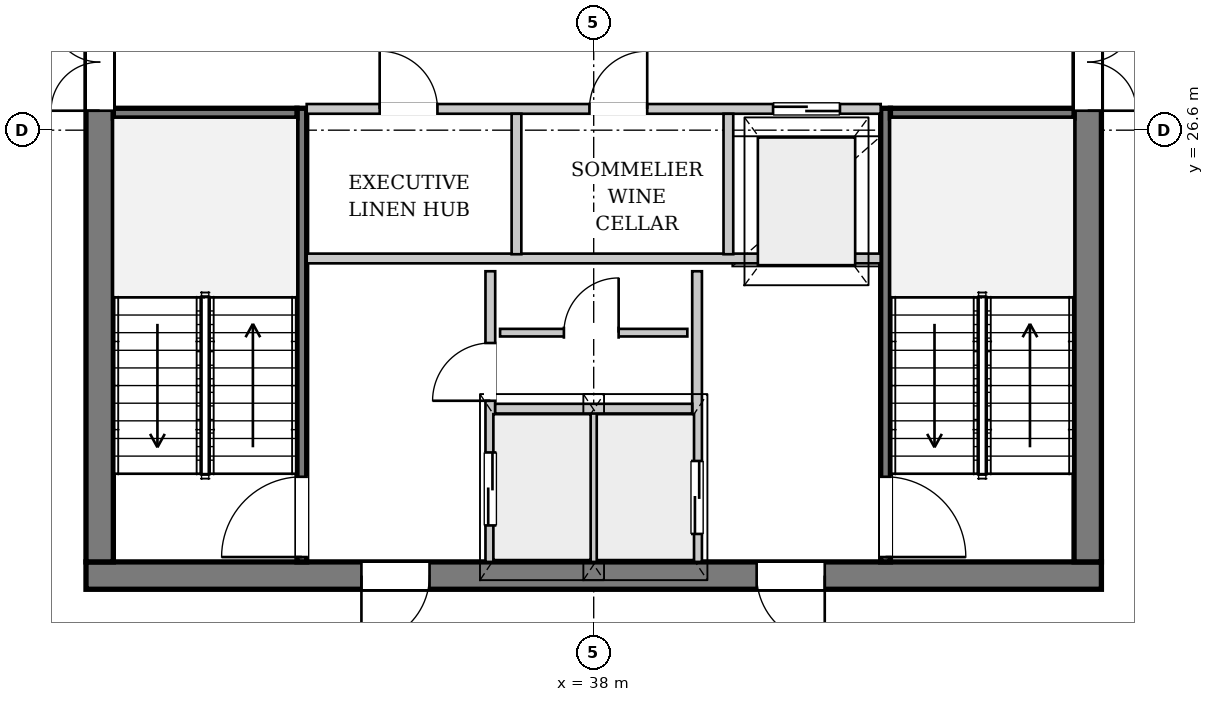
"""IFC4 building model, lengths in metres.
Left out: names, types, materials, properties, quantities, classifications, styles, units other than length and angle.
Written with IfcOpenShell. Run it as: python <this file> out.ifc"""

import sys

from ifc_helpers import new_model, si_unit, direction, frame, frame_2d, origin, place, context, subcontext, project, spatial, rectangle, extrude, source, transform, mapped, element, fill, save


model = new_model("IFC4")
c1 = context("Model", 3, precision=1e-05, world=origin(), true_north=direction((0.0, 1.0)))
c2 = subcontext(c1, "Body", "Model", "MODEL_VIEW")
j1 = project(units=[si_unit("LENGTHUNIT", "METRE"), si_unit("PLANEANGLEUNIT", "RADIAN")], contexts=[c1])
p1 = place(None, origin())
s1 = spatial("IfcSite", under=j1, at=p1, CompositionType="ELEMENT")
p2 = place(p1, origin())
s2 = spatial("IfcBuilding", under=s1, at=p2, CompositionType="ELEMENT")
p3 = place(p2, frame((0.0, 0.0, 263.3)))
s3 = spatial("IfcBuildingStorey", under=s2, at=p3, CompositionType="ELEMENT", Elevation=263.3)
p4 = place(p3, frame((51.577, 26.839, 0.0), z_axis=(0.0, 0.0, 1.0), x_axis=(-0.252928525252, -0.967484966867, 0.0)))
e1 = element("IfcWall", 1, at=p4, inside=s3, PredefinedType="SOLIDWALL", context=c2, shape_type="SweptSolid", body=[
    extrude(rectangle(XDim=22.323, YDim=0.32, at=frame_2d((11.161, 0.0))), origin(), (0.0, 0.0, 1.0), 2.872),
])
p5 = place(p4, frame((6.393, 0.0, 0.0)))
e2 = element("IfcOpeningElement", 2, at=p5, cuts=e1, PredefinedType="OPENING", context=c2, shape_type="SweptSolid", body=[
    extrude(rectangle(XDim=1.5, YDim=2.3, at=frame_2d((0.75, 1.15))), frame((0.0, 0.17, 0.0), z_axis=(0.0, -1.0, 0.0), x_axis=(1.0, 0.0, 0.0)), (0.0, 0.0, 1.0), 0.34),
])
p6 = place(p4, frame((15.219, 0.0, 0.402)))
e3 = element("IfcOpeningElement", 3, at=p6, cuts=e1, PredefinedType="OPENING", context=c2, shape_type="SweptSolid", body=[
    extrude(rectangle(XDim=2.6, YDim=2.35, at=frame_2d((1.3, 1.175))), frame((0.0, 0.17, 0.0), z_axis=(0.0, -1.0, 0.0), x_axis=(1.0, 0.0, 0.0)), (0.0, 0.0, 1.0), 0.34),
])
p7 = place(p3, frame((15.894, 26.68, 0.0), z_axis=(0.0, 0.0, 1.0), x_axis=(0.802229105353, 0.59701630005, 0.0)))
e4 = element("IfcWall", 4, at=p7, inside=s3, PredefinedType="SOLIDWALL", context=c2, shape_type="SweptSolid", body=[
    extrude(rectangle(XDim=21.802, YDim=0.38, at=frame_2d((10.901, 0.0))), origin(), (0.0, 0.0, 1.0), 2.872),
])
p8 = place(p7, frame((7.105, 0.0, 0.65)))
e5 = element("IfcOpeningElement", 5, at=p8, cuts=e4, PredefinedType="OPENING", context=c2, shape_type="SweptSolid", body=[
    extrude(rectangle(XDim=1.2, YDim=1.5, at=frame_2d((0.6, 0.75))), frame((0.0, 0.2, 0.0), z_axis=(0.0, -1.0, 0.0), x_axis=(1.0, 0.0, 0.0)), (0.0, 0.0, 1.0), 0.4),
])
p9 = place(p7, frame((16.698, 0.0, 0.65)))
e6 = element("IfcOpeningElement", 6, at=p9, cuts=e4, PredefinedType="OPENING", context=c2, shape_type="SweptSolid", body=[
    extrude(rectangle(XDim=1.2, YDim=1.5, at=frame_2d((0.6, 0.75))), frame((0.0, 0.2, 0.0), z_axis=(0.0, -1.0, 0.0), x_axis=(1.0, 0.0, 0.0)), (0.0, 0.0, 1.0), 0.4),
])
p10 = place(p3, frame((46.35, 19.275, 0.0), z_axis=(0.0, 0.0, 1.0), x_axis=(-1.0, 0.0, 0.0)))
e7 = element("IfcWall", 7, at=p10, inside=s3, PredefinedType="SHEAR", context=c2, shape_type="SweptSolid", body=[
    extrude(rectangle(XDim=16.7, YDim=0.45, at=frame_2d((8.35, 0.0))), origin(), (0.0, 0.0, 1.0), 3.38),
])
p11 = place(p10, frame((4.55, 0.0, 0.0)))
e8 = element("IfcOpeningElement", 8, at=p11, cuts=e7, PredefinedType="OPENING", context=c2, shape_type="SweptSolid", body=[
    extrude(rectangle(XDim=1.12, YDim=2.25, at=frame_2d((0.56, 1.125))), frame((0.0, 0.235, 0.0), z_axis=(0.0, -1.0, 0.0), x_axis=(1.0, 0.0, 0.0)), (0.0, 0.0, 1.0), 0.47),
])
p12 = place(p10, frame((11.05, 0.0, 0.0)))
e9 = element("IfcOpeningElement", 9, at=p12, cuts=e7, PredefinedType="OPENING", context=c2, shape_type="SweptSolid", body=[
    extrude(rectangle(XDim=1.12, YDim=2.25, at=frame_2d((0.56, 1.125))), frame((0.0, 0.235, 0.0), z_axis=(0.0, -1.0, 0.0), x_axis=(1.0, 0.0, 0.0)), (0.0, 0.0, 1.0), 0.47),
])
p13 = place(p3, frame((29.875, 19.5, 0.0), z_axis=(0.0, 0.0, 1.0), x_axis=(0.0, 1.0, 0.0)))
e10 = element("IfcWall", 10, at=p13, inside=s3, PredefinedType="SHEAR", context=c2, shape_type="SweptSolid", body=[
    extrude(rectangle(XDim=14.2, YDim=0.45, at=frame_2d((7.1, 0.0))), origin(), (0.0, 0.0, 1.0), 3.38),
])
p14 = place(p13, frame((7.42, 0.0, 0.0)))
e11 = element("IfcOpeningElement", 11, at=p14, cuts=e10, PredefinedType="OPENING", context=c2, shape_type="SweptSolid", body=[
    extrude(rectangle(XDim=1.6, YDim=2.2, at=frame_2d((0.8, 1.1))), frame((0.0, 0.235, 0.0), z_axis=(0.0, -1.0, 0.0), x_axis=(1.0, 0.0, 0.0)), (0.0, 0.0, 1.0), 0.47),
])
p15 = place(p3, frame((46.125, 33.7, 0.0), z_axis=(0.0, 0.0, 1.0), x_axis=(0.0, -1.0, 0.0)))
e12 = element("IfcWall", 12, at=p15, inside=s3, PredefinedType="SHEAR", context=c2, shape_type="SweptSolid", body=[
    extrude(rectangle(XDim=14.2, YDim=0.45, at=frame_2d((7.1, 0.0))), origin(), (0.0, 0.0, 1.0), 3.38),
])
p16 = place(p15, frame((5.18, 0.0, 0.0)))
e13 = element("IfcOpeningElement", 13, at=p16, cuts=e12, PredefinedType="OPENING", context=c2, shape_type="SweptSolid", body=[
    extrude(rectangle(XDim=1.6, YDim=2.2, at=frame_2d((0.8, 1.1))), frame((0.0, 0.235, 0.0), z_axis=(0.0, -1.0, 0.0), x_axis=(1.0, 0.0, 0.0)), (0.0, 0.0, 1.0), 0.47),
])
p17 = place(p15, frame((2.05, 0.0, 0.0)))
e14 = element("IfcOpeningElement", 14, at=p17, cuts=e12, PredefinedType="OPENING", context=c2, shape_type="SweptSolid", body=[
    extrude(rectangle(XDim=0.95, YDim=2.1, at=frame_2d((0.475, 1.05))), frame((0.0, 0.235, 0.0), z_axis=(0.0, -1.0, 0.0), x_axis=(1.0, 0.0, 0.0)), (0.0, 0.0, 1.0), 0.47),
])
p18 = place(p3, frame((33.2, 19.5, 0.0), z_axis=(0.0, 0.0, 1.0), x_axis=(0.0, 1.0, 0.0)))
e15 = element("IfcWall", 15, at=p18, inside=s3, PredefinedType="PARTITIONING", context=c2, shape_type="SweptSolid", body=[
    extrude(rectangle(XDim=7.46, YDim=0.16, at=frame_2d((3.73, 0.0))), origin(), (0.0, 0.0, 1.0), 3.38),
])
p19 = place(p18, frame((0.08, 0.0, 0.0)))
e16 = element("IfcOpeningElement", 16, at=p19, cuts=e15, PredefinedType="OPENING", context=c2, shape_type="SweptSolid", body=[
    extrude(rectangle(XDim=1.32, YDim=2.2, at=frame_2d((0.66, 1.1))), frame((0.0, 0.09, 0.0), z_axis=(0.0, -1.0, 0.0), x_axis=(1.0, 0.0, 0.0)), (0.0, 0.0, 1.0), 0.18),
])
p20 = place(p3, frame((30.1, 26.88, 0.0), z_axis=(0.0, 0.0, 1.0), x_axis=(1.0, 0.0, 0.0)))
e17 = element("IfcWall", 17, at=p20, inside=s3, PredefinedType="PARTITIONING", context=c2, shape_type="SweptSolid", body=[
    extrude(rectangle(XDim=3.02, YDim=0.16, at=frame_2d((1.51, 0.0))), origin(), (0.0, 0.0, 1.0), 3.38),
])
p21 = place(p3, frame((42.8, 26.96, 0.0), z_axis=(0.0, 0.0, 1.0), x_axis=(0.0, -1.0, 0.0)))
e18 = element("IfcWall", 18, at=p21, inside=s3, PredefinedType="PARTITIONING", context=c2, shape_type="SweptSolid", body=[
    extrude(rectangle(XDim=7.46, YDim=0.16, at=frame_2d((3.73, 0.0))), origin(), (0.0, 0.0, 1.0), 3.38),
])
p22 = place(p21, frame((6.06, 0.0, 0.0)))
e19 = element("IfcOpeningElement", 19, at=p22, cuts=e18, PredefinedType="OPENING", context=c2, shape_type="SweptSolid", body=[
    extrude(rectangle(XDim=1.32, YDim=2.2, at=frame_2d((0.66, 1.1))), frame((0.0, 0.09, 0.0), z_axis=(0.0, -1.0, 0.0), x_axis=(1.0, 0.0, 0.0)), (0.0, 0.0, 1.0), 0.18),
])
p23 = place(p3, frame((42.88, 26.88, 0.0), z_axis=(0.0, 0.0, 1.0), x_axis=(1.0, 0.0, 0.0)))
e20 = element("IfcWall", 20, at=p23, inside=s3, PredefinedType="PARTITIONING", context=c2, shape_type="SweptSolid", body=[
    extrude(rectangle(XDim=3.02, YDim=0.16, at=frame_2d((1.51, 0.0))), origin(), (0.0, 0.0, 1.0), 3.38),
])
p24 = place(p3, frame((36.3, 19.5, 0.0), z_axis=(0.0, 0.0, 1.0), x_axis=(0.0, 1.0, 0.0)))
e21 = element("IfcWall", 21, at=p24, inside=s3, PredefinedType="PARTITIONING", context=c2, shape_type="SweptSolid", body=[
    extrude(rectangle(XDim=4.78, YDim=0.16, at=frame_2d((2.39, 0.0))), origin(), (0.0, 0.0, 1.0), 3.38),
])
p25 = place(p24, frame((0.6, 0.0, 0.0)))
e22 = element("IfcOpeningElement", 22, at=p25, cuts=e21, PredefinedType="OPENING", context=c2, shape_type="SweptSolid", body=[
    extrude(rectangle(XDim=1.2, YDim=2.2, at=frame_2d((0.6, 1.1))), frame((0.0, 0.09, 0.0), z_axis=(0.0, -1.0, 0.0), x_axis=(1.0, 0.0, 0.0)), (0.0, 0.0, 1.0), 0.18),
])
p26 = place(p24, frame((2.65, 0.0, 0.0)))
e23 = element("IfcOpeningElement", 23, at=p26, cuts=e21, PredefinedType="OPENING", context=c2, shape_type="SweptSolid", body=[
    extrude(rectangle(XDim=0.95, YDim=2.1, at=frame_2d((0.475, 1.05))), frame((0.0, 0.09, 0.0), z_axis=(0.0, -1.0, 0.0), x_axis=(1.0, 0.0, 0.0)), (0.0, 0.0, 1.0), 0.18),
])
p27 = place(p3, frame((39.7, 24.28, 0.0), z_axis=(0.0, 0.0, 1.0), x_axis=(0.0, -1.0, 0.0)))
e24 = element("IfcWall", 24, at=p27, inside=s3, PredefinedType="PARTITIONING", context=c2, shape_type="SweptSolid", body=[
    extrude(rectangle(XDim=4.78, YDim=0.16, at=frame_2d((2.39, 0.0))), origin(), (0.0, 0.0, 1.0), 3.38),
])
p28 = place(p27, frame((3.12, 0.0, 0.0)))
e25 = element("IfcOpeningElement", 25, at=p28, cuts=e24, PredefinedType="OPENING", context=c2, shape_type="SweptSolid", body=[
    extrude(rectangle(XDim=1.2, YDim=2.2, at=frame_2d((0.6, 1.1))), frame((0.0, 0.09, 0.0), z_axis=(0.0, -1.0, 0.0), x_axis=(1.0, 0.0, 0.0)), (0.0, 0.0, 1.0), 0.18),
])
p29 = place(p3, frame((38.0, 19.5, 0.0), z_axis=(0.0, 0.0, 1.0), x_axis=(0.0, 1.0, 0.0)))
e26 = element("IfcWall", 26, at=p29, inside=s3, PredefinedType="PARTITIONING", context=c2, shape_type="SweptSolid", body=[
    extrude(rectangle(XDim=2.46, YDim=0.125, at=frame_2d((1.23, 0.0))), origin(), (0.0, 0.0, 1.0), 3.38),
])
p30 = place(p3, frame((36.38, 22.02, 0.0), z_axis=(0.0, 0.0, 1.0), x_axis=(1.0, 0.0, 0.0)))
e27 = element("IfcWall", 27, at=p30, inside=s3, PredefinedType="PARTITIONING", context=c2, shape_type="SweptSolid", body=[
    extrude(rectangle(XDim=3.24, YDim=0.16, at=frame_2d((1.62, 0.0))), origin(), (0.0, 0.0, 1.0), 3.38),
])
p31 = place(p3, frame((33.28, 24.49, 0.0), z_axis=(0.0, 0.0, 1.0), x_axis=(1.0, 0.0, 0.0)))
e28 = element("IfcWall", 28, at=p31, inside=s3, PredefinedType="PARTITIONING", context=c2, shape_type="SweptSolid", body=[
    extrude(rectangle(XDim=9.44, YDim=0.16, at=frame_2d((4.72, 0.0))), origin(), (0.0, 0.0, 1.0), 3.38),
])
p32 = place(p3, frame((36.46, 23.27, 0.0), z_axis=(0.0, 0.0, 1.0), x_axis=(1.0, 0.0, 0.0)))
e29 = element("IfcWall", 29, at=p32, inside=s3, PredefinedType="PARTITIONING", context=c2, shape_type="SweptSolid", body=[
    extrude(rectangle(XDim=3.08, YDim=0.125, at=frame_2d((1.54, 0.0))), origin(), (0.0, 0.0, 1.0), 3.38),
])
p33 = place(p32, frame((1.05, 0.0, 0.0)))
e30 = element("IfcOpeningElement", 30, at=p33, cuts=e29, PredefinedType="OPENING", context=c2, shape_type="SweptSolid", body=[
    extrude(rectangle(XDim=0.9, YDim=2.1, at=frame_2d((0.45, 1.05))), frame((0.0, 0.073, 0.0), z_axis=(0.0, -1.0, 0.0), x_axis=(1.0, 0.0, 0.0)), (0.0, 0.0, 1.0), 0.145),
])
p34 = place(p3, frame((33.28, 26.95, 0.0), z_axis=(0.0, 0.0, 1.0), x_axis=(1.0, 0.0, 0.0)))
e31 = element("IfcWall", 31, at=p34, inside=s3, PredefinedType="PARTITIONING", context=c2, shape_type="SweptSolid", body=[
    extrude(rectangle(XDim=9.44, YDim=0.16, at=frame_2d((4.72, 0.0))), origin(), (0.0, 0.0, 1.0), 3.38),
])
p35 = place(p34, frame((1.2, 0.0, 0.0)))
e32 = element("IfcOpeningElement", 32, at=p35, cuts=e31, PredefinedType="OPENING", context=c2, shape_type="SweptSolid", body=[
    extrude(rectangle(XDim=0.95, YDim=2.1, at=frame_2d((0.475, 1.05))), frame((0.0, 0.09, 0.0), z_axis=(0.0, -1.0, 0.0), x_axis=(1.0, 0.0, 0.0)), (0.0, 0.0, 1.0), 0.18),
])
p36 = place(p34, frame((4.65, 0.0, 0.0)))
e33 = element("IfcOpeningElement", 33, at=p36, cuts=e31, PredefinedType="OPENING", context=c2, shape_type="SweptSolid", body=[
    extrude(rectangle(XDim=0.95, YDim=2.1, at=frame_2d((0.475, 1.05))), frame((0.0, 0.09, 0.0), z_axis=(0.0, -1.0, 0.0), x_axis=(1.0, 0.0, 0.0)), (0.0, 0.0, 1.0), 0.18),
])
p37 = place(p34, frame((7.67, 0.0, 0.0)))
e34 = element("IfcOpeningElement", 34, at=p37, cuts=e31, PredefinedType="OPENING", context=c2, shape_type="SweptSolid", body=[
    extrude(rectangle(XDim=1.1, YDim=2.2, at=frame_2d((0.55, 1.1))), frame((0.0, 0.09, 0.0), z_axis=(0.0, -1.0, 0.0), x_axis=(1.0, 0.0, 0.0)), (0.0, 0.0, 1.0), 0.18),
])
for number, where, z_axis, x_axis in (
    (35, (36.73, 24.56, 0.0), (0.0, 0.0, 1.0), (0.0, 1.0, 0.0)),
    (36, (40.215, 24.56, 0.0), (0.0, 0.0, 1.0), (0.0, 1.0, 0.0)),
):
    element("IfcWall", number, at=place(p3, frame(where, z_axis=z_axis, x_axis=x_axis)), inside=s3, PredefinedType="PARTITIONING", context=c2, shape_type="SweptSolid", body=[
        extrude(rectangle(XDim=2.31, YDim=0.16, at=frame_2d((1.155, 0.0))), origin(), (0.0, 0.0, 1.0), 3.38),
    ])
m1 = source(origin(), c2, "Body", "SweptSolid", [
    extrude(rectangle(XDim=1.12, YDim=2.25, at=frame_2d((0.56, 1.125))), frame((0.0, 0.025, 0.0), z_axis=(0.0, -1.0, 0.0), x_axis=(1.0, 0.0, 0.0)), (0.0, 0.0, 1.0), 0.05),
])
p38 = place(p11, origin())
e37 = element("IfcDoor", 37, at=p38, inside=s3, OperationType="SINGLE_SWING_LEFT", PredefinedType="DOOR", context=c2, shape_type="MappedRepresentation", body=[
    mapped(m1, transform((0.0, 0.0, 0.0), x_axis=(1.0, 0.0, 0.0), y_axis=(0.0, 1.0, 0.0), z_axis=(0.0, 0.0, 1.0), scale=1.0)),
])
fill(e8, e37)
p39 = place(p12, origin())
e38 = element("IfcDoor", 38, at=p39, inside=s3, OperationType="SINGLE_SWING_RIGHT", PredefinedType="DOOR", context=c2, shape_type="MappedRepresentation", body=[
    mapped(m1, transform((0.0, 0.0, 0.0), x_axis=(1.0, 0.0, 0.0), y_axis=(0.0, 1.0, 0.0), z_axis=(0.0, 0.0, 1.0), scale=1.0)),
])
fill(e9, e38)
m2 = source(origin(), c2, "Body", "SweptSolid", [
    extrude(rectangle(XDim=1.6, YDim=2.2, at=frame_2d((0.8, 1.1))), frame((0.0, 0.025, 0.0), z_axis=(0.0, -1.0, 0.0), x_axis=(1.0, 0.0, 0.0)), (0.0, 0.0, 1.0), 0.05),
])
p40 = place(p14, origin())
e39 = element("IfcDoor", 39, at=p40, inside=s3, OperationType="DOUBLE_DOOR_SINGLE_SWING", PredefinedType="DOOR", context=c2, shape_type="MappedRepresentation", body=[
    mapped(m2, transform((0.0, 0.0, 0.0), x_axis=(1.0, 0.0, 0.0), y_axis=(0.0, 1.0, 0.0), z_axis=(0.0, 0.0, 1.0), scale=1.0)),
])
fill(e11, e39)
p41 = place(p16, origin())
e40 = element("IfcDoor", 40, at=p41, inside=s3, OperationType="DOUBLE_DOOR_SINGLE_SWING", PredefinedType="DOOR", context=c2, shape_type="MappedRepresentation", body=[
    mapped(m2, transform((0.0, 0.0, 0.0), x_axis=(1.0, 0.0, 0.0), y_axis=(0.0, 1.0, 0.0), z_axis=(0.0, 0.0, 1.0), scale=1.0)),
])
fill(e13, e40)
m3 = source(origin(), c2, "Body", "SweptSolid", [
    extrude(rectangle(XDim=1.32, YDim=2.2, at=frame_2d((0.66, 1.1))), frame((0.0, 0.025, 0.0), z_axis=(0.0, -1.0, 0.0), x_axis=(1.0, 0.0, 0.0)), (0.0, 0.0, 1.0), 0.05),
])
p42 = place(p19, origin())
e41 = element("IfcDoor", 41, at=p42, inside=s3, OperationType="SINGLE_SWING_LEFT", PredefinedType="DOOR", context=c2, shape_type="MappedRepresentation", body=[
    mapped(m3, transform((0.0, 0.0, 0.0), x_axis=(1.0, 0.0, 0.0), y_axis=(0.0, 1.0, 0.0), z_axis=(0.0, 0.0, 1.0), scale=1.0)),
])
fill(e16, e41)
p43 = place(p22, origin())
e42 = element("IfcDoor", 42, at=p43, inside=s3, OperationType="SINGLE_SWING_RIGHT", PredefinedType="DOOR", context=c2, shape_type="MappedRepresentation", body=[
    mapped(m3, transform((0.0, 0.0, 0.0), x_axis=(1.0, 0.0, 0.0), y_axis=(0.0, 1.0, 0.0), z_axis=(0.0, 0.0, 1.0), scale=1.0)),
])
fill(e19, e42)
m4 = source(origin(), c2, "Body", "SweptSolid", [
    extrude(rectangle(XDim=1.2, YDim=2.2, at=frame_2d((0.6, 1.1))), frame((0.0, 0.025, 0.0), z_axis=(0.0, -1.0, 0.0), x_axis=(1.0, 0.0, 0.0)), (0.0, 0.0, 1.0), 0.05),
])
p44 = place(p25, origin())
e43 = element("IfcDoor", 43, at=p44, inside=s3, OperationType="DOUBLE_DOOR_SLIDING", PredefinedType="DOOR", context=c2, shape_type="MappedRepresentation", body=[
    mapped(m4, transform((0.0, 0.0, 0.0), x_axis=(1.0, 0.0, 0.0), y_axis=(0.0, 1.0, 0.0), z_axis=(0.0, 0.0, 1.0), scale=1.0)),
])
fill(e22, e43)
m5 = source(origin(), c2, "Body", "SweptSolid", [
    extrude(rectangle(XDim=0.95, YDim=2.1, at=frame_2d((0.475, 1.05))), frame((0.0, 0.025, 0.0), z_axis=(0.0, -1.0, 0.0), x_axis=(1.0, 0.0, 0.0)), (0.0, 0.0, 1.0), 0.05),
])
p45 = place(p26, origin())
e44 = element("IfcDoor", 44, at=p45, inside=s3, OperationType="SINGLE_SWING_LEFT", PredefinedType="DOOR", context=c2, shape_type="MappedRepresentation", body=[
    mapped(m5, transform((0.0, 0.0, 0.0), x_axis=(1.0, 0.0, 0.0), y_axis=(0.0, 1.0, 0.0), z_axis=(0.0, 0.0, 1.0), scale=1.0)),
])
fill(e23, e44)
m6 = source(origin(), c2, "Body", "SweptSolid", [
    extrude(rectangle(XDim=0.9, YDim=2.1, at=frame_2d((0.45, 1.05))), frame((0.0, 0.025, 0.0), z_axis=(0.0, -1.0, 0.0), x_axis=(1.0, 0.0, 0.0)), (0.0, 0.0, 1.0), 0.05),
])
p46 = place(p33, origin())
e45 = element("IfcDoor", 45, at=p46, inside=s3, OperationType="SINGLE_SWING_RIGHT", PredefinedType="DOOR", context=c2, shape_type="MappedRepresentation", body=[
    mapped(m6, transform((0.0, 0.0, 0.0), x_axis=(1.0, 0.0, 0.0), y_axis=(0.0, 1.0, 0.0), z_axis=(0.0, 0.0, 1.0), scale=1.0)),
])
fill(e30, e45)
p47 = place(p28, origin())
e46 = element("IfcDoor", 46, at=p47, inside=s3, OperationType="DOUBLE_DOOR_SLIDING", PredefinedType="DOOR", context=c2, shape_type="MappedRepresentation", body=[
    mapped(m4, transform((0.0, 0.0, 0.0), x_axis=(1.0, 0.0, 0.0), y_axis=(0.0, 1.0, 0.0), z_axis=(0.0, 0.0, 1.0), scale=1.0)),
])
fill(e25, e46)
p48 = place(p35, origin())
e47 = element("IfcDoor", 47, at=p48, inside=s3, OperationType="SINGLE_SWING_LEFT", PredefinedType="DOOR", context=c2, shape_type="MappedRepresentation", body=[
    mapped(m5, transform((0.0, 0.0, 0.0), x_axis=(1.0, 0.0, 0.0), y_axis=(0.0, 1.0, 0.0), z_axis=(0.0, 0.0, 1.0), scale=1.0)),
])
fill(e32, e47)
p49 = place(p36, origin())
e48 = element("IfcDoor", 48, at=p49, inside=s3, OperationType="SINGLE_SWING_RIGHT", PredefinedType="DOOR", context=c2, shape_type="MappedRepresentation", body=[
    mapped(m5, transform((0.0, 0.0, 0.0), x_axis=(1.0, 0.0, 0.0), y_axis=(0.0, 1.0, 0.0), z_axis=(0.0, 0.0, 1.0), scale=1.0)),
])
fill(e33, e48)
m7 = source(origin(), c2, "Body", "SweptSolid", [
    extrude(rectangle(XDim=1.1, YDim=2.2, at=frame_2d((0.55, 1.1))), frame((0.0, 0.025, 0.0), z_axis=(0.0, -1.0, 0.0), x_axis=(1.0, 0.0, 0.0)), (0.0, 0.0, 1.0), 0.05),
])
p50 = place(p37, origin())
e49 = element("IfcDoor", 49, at=p50, inside=s3, OperationType="DOUBLE_DOOR_SLIDING", PredefinedType="DOOR", context=c2, shape_type="MappedRepresentation", body=[
    mapped(m7, transform((0.0, 0.0, 0.0), x_axis=(1.0, 0.0, 0.0), y_axis=(0.0, 1.0, 0.0), z_axis=(0.0, 0.0, 1.0), scale=1.0)),
])
fill(e34, e49)
save(model, sys.argv[1])
